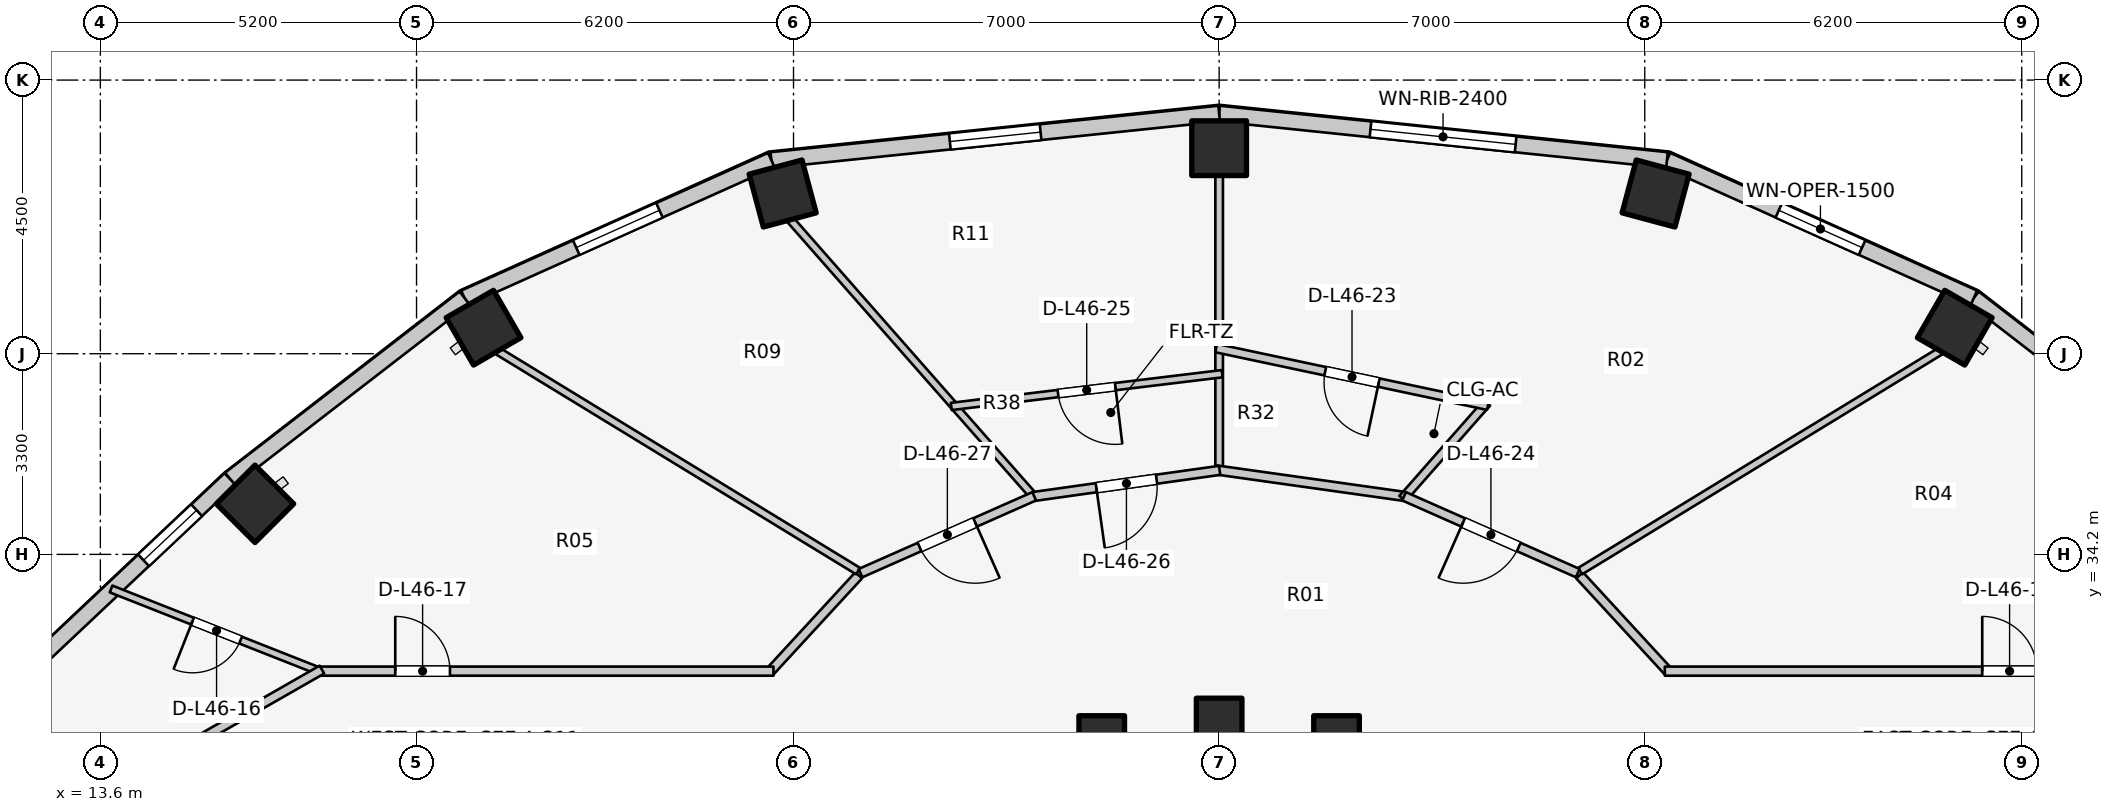
"""IFC4 building model, lengths in metres.
Left out: names, types, materials, properties, quantities, classifications, styles, units other than length and angle.
Written with IfcOpenShell. Run it as: python <this file> out.ifc"""

import sys

from ifc_helpers import new_model, si_unit, direction, frame, frame_2d, origin, origin_2d, place, context, subcontext, project, spatial, rectangle, extrude, element, fill, save


model = new_model("IFC4")
c1 = context("Model", 3, precision=1e-05, world=origin(), true_north=direction((0.0, 1.0)))
c2 = subcontext(c1, "Body", "Model", "MODEL_VIEW")
j1 = project(units=[si_unit("LENGTHUNIT", "METRE"), si_unit("PLANEANGLEUNIT", "RADIAN")], contexts=[c1])
p1 = place(None, origin())
s1 = spatial("IfcSite", under=j1, at=p1, CompositionType="ELEMENT")
p2 = place(p1, origin())
s2 = spatial("IfcBuilding", under=s1, at=p2, CompositionType="ELEMENT")
p3 = place(p2, frame((0.0, 0.0, 152.9)))
s3 = spatial("IfcBuildingStorey", under=s2, at=p3, CompositionType="ELEMENT", Elevation=152.9)
p4 = place(p3, frame((44.098, 37.928, 0.0), z_axis=(0.0, 0.0, 1.0), x_axis=(0.5, 0.866025403784, 0.0)))
e1 = element("IfcColumn", 1, at=p4, inside=s3, PredefinedType="COLUMN", context=c2, shape_type="SweptSolid", body=[
    extrude(rectangle(XDim=0.9, YDim=0.9, at=origin_2d()), origin(), (0.0, 0.0, 1.0), 3.1),
])
p5 = place(p3, frame((33.931, 31.172, 0.0), z_axis=(0.0, 0.0, 1.0), x_axis=(1.0, 0.0, 0.0)))
e2 = element("IfcColumn", 2, at=p5, inside=s3, PredefinedType="COLUMN", context=c2, shape_type="SweptSolid", body=[
    extrude(rectangle(XDim=0.75, YDim=0.75, at=origin_2d()), origin(), (0.0, 0.0, 1.0), 3.1),
])
p6 = place(p3, frame((39.178, 40.135, 0.0), z_axis=(0.0, 0.0, 1.0), x_axis=(0.258819045103, 0.965925826289, 0.0)))
e3 = element("IfcColumn", 3, at=p6, inside=s3, PredefinedType="COLUMN", context=c2, shape_type="SweptSolid", body=[
    extrude(rectangle(XDim=0.9, YDim=0.9, at=origin_2d()), origin(), (0.0, 0.0, 1.0), 3.1),
])
p7 = place(p3, frame((32.0, 31.46, 0.0), z_axis=(0.0, 0.0, 1.0), x_axis=(1.0, 0.0, 0.0)))
e4 = element("IfcColumn", 4, at=p7, inside=s3, PredefinedType="COLUMN", context=c2, shape_type="SweptSolid", body=[
    extrude(rectangle(XDim=0.75, YDim=0.75, at=origin_2d()), origin(), (0.0, 0.0, 1.0), 3.1),
])
p8 = place(p3, frame((32.0, 40.88, 0.0), z_axis=(0.0, 0.0, 1.0), x_axis=(0.0, 1.0, 0.0)))
e5 = element("IfcColumn", 5, at=p8, inside=s3, PredefinedType="COLUMN", context=c2, shape_type="SweptSolid", body=[
    extrude(rectangle(XDim=0.9, YDim=0.9, at=origin_2d()), origin(), (0.0, 0.0, 1.0), 3.1),
])
p9 = place(p3, frame((30.069, 31.172, 0.0), z_axis=(0.0, 0.0, 1.0), x_axis=(1.0, 0.0, 0.0)))
e6 = element("IfcColumn", 6, at=p9, inside=s3, PredefinedType="COLUMN", context=c2, shape_type="SweptSolid", body=[
    extrude(rectangle(XDim=0.75, YDim=0.75, at=origin_2d()), origin(), (0.0, 0.0, 1.0), 3.1),
])
for number, where, z_axis, x_axis in (
    (7, (24.822, 40.135, 0.0), (0.0, 0.0, 1.0), (-0.259, 0.966, 0.0)),
    (8, (19.902, 37.928, 0.0), (0.0, 0.0, 1.0), (-0.5, 0.866, 0.0)),
    (9, (16.143, 35.031, 0.0), (0.0, 0.0, 1.0), (-0.707, 0.707, 0.0)),
):
    element("IfcColumn", number, at=place(p3, frame(where, z_axis=z_axis, x_axis=x_axis)), inside=s3, PredefinedType="COLUMN", context=c2, shape_type="SweptSolid", body=[
        extrude(rectangle(XDim=0.9, YDim=0.9, at=origin_2d()), origin(), (0.0, 0.0, 1.0), 3.1),
    ])
p10 = place(p3, frame((48.269, 35.441, 0.0), z_axis=(0.0, 0.0, 1.0), x_axis=(-0.791460185804, 0.611220724687, 0.0)))
e10 = element("IfcWall", 10, at=p10, inside=s3, PredefinedType="STANDARD", context=c2, shape_type="SweptSolid", body=[
    extrude(rectangle(XDim=4.872, YDim=0.26, at=frame_2d((2.436, 0.0))), origin(), (0.0, 0.0, 1.0), 2.85),
])
p11 = place(p3, frame((44.413, 38.419, 0.0), z_axis=(0.0, 0.0, 1.0), x_axis=(-0.912353637112, 0.409403029847, 0.0)))
e11 = element("IfcWall", 11, at=p11, inside=s3, PredefinedType="STANDARD", context=c2, shape_type="SweptSolid", body=[
    extrude(rectangle(XDim=5.533, YDim=0.26, at=frame_2d((2.766, 0.0))), origin(), (0.0, 0.0, 1.0), 2.85),
])
p12 = place(p11, frame((2.016, 0.0, 0.75)))
e12 = element("IfcOpeningElement", 12, at=p12, cuts=e11, PredefinedType="OPENING", context=c2, shape_type="SweptSolid", body=[
    extrude(rectangle(XDim=1.5, YDim=1.6, at=frame_2d((0.75, 0.8))), frame((0.0, 0.14, 0.0), z_axis=(0.0, -1.0, 0.0), x_axis=(1.0, 0.0, 0.0)), (0.0, 0.0, 1.0), 0.28),
])
p13 = place(p3, frame((39.365, 40.685, 0.0), z_axis=(0.0, 0.0, 1.0), x_axis=(-0.994664178965, 0.10316574569, 0.0)))
e13 = element("IfcWall", 13, at=p13, inside=s3, PredefinedType="STANDARD", context=c2, shape_type="SweptSolid", body=[
    extrude(rectangle(XDim=7.405, YDim=0.26, at=frame_2d((3.702, 0.0))), origin(), (0.0, 0.0, 1.0), 2.85),
])
p14 = place(p13, frame((2.502, 0.0, 0.75)))
e14 = element("IfcOpeningElement", 14, at=p14, cuts=e13, PredefinedType="OPENING", context=c2, shape_type="SweptSolid", body=[
    extrude(rectangle(XDim=2.4, YDim=1.7, at=frame_2d((1.2, 0.85))), frame((0.0, 0.14, 0.0), z_axis=(0.0, -1.0, 0.0), x_axis=(1.0, 0.0, 0.0)), (0.0, 0.0, 1.0), 0.28),
])
p15 = place(p3, frame((32.0, 41.448, 0.0), z_axis=(0.0, 0.0, 1.0), x_axis=(-0.994664178965, -0.10316574569, 0.0)))
e15 = element("IfcWall", 15, at=p15, inside=s3, PredefinedType="STANDARD", context=c2, shape_type="SweptSolid", body=[
    extrude(rectangle(XDim=7.405, YDim=0.26, at=frame_2d((3.702, 0.0))), origin(), (0.0, 0.0, 1.0), 2.85),
])
p16 = place(p15, frame((2.952, 0.0, 0.75)))
e16 = element("IfcOpeningElement", 16, at=p16, cuts=e15, PredefinedType="OPENING", context=c2, shape_type="SweptSolid", body=[
    extrude(rectangle(XDim=1.5, YDim=1.6, at=frame_2d((0.75, 0.8))), frame((0.0, 0.14, 0.0), z_axis=(0.0, -1.0, 0.0), x_axis=(1.0, 0.0, 0.0)), (0.0, 0.0, 1.0), 0.28),
])
p17 = place(p3, frame((24.635, 40.685, 0.0), z_axis=(0.0, 0.0, 1.0), x_axis=(-0.912353637112, -0.409403029847, 0.0)))
e17 = element("IfcWall", 17, at=p17, inside=s3, PredefinedType="STANDARD", context=c2, shape_type="SweptSolid", body=[
    extrude(rectangle(XDim=5.533, YDim=0.26, at=frame_2d((2.766, 0.0))), origin(), (0.0, 0.0, 1.0), 2.85),
])
p18 = place(p17, frame((2.016, 0.0, 0.75)))
e18 = element("IfcOpeningElement", 18, at=p18, cuts=e17, PredefinedType="OPENING", context=c2, shape_type="SweptSolid", body=[
    extrude(rectangle(XDim=1.5, YDim=1.6, at=frame_2d((0.75, 0.8))), frame((0.0, 0.14, 0.0), z_axis=(0.0, -1.0, 0.0), x_axis=(1.0, 0.0, 0.0)), (0.0, 0.0, 1.0), 0.28),
])
p19 = place(p3, frame((19.587, 38.419, 0.0), z_axis=(0.0, 0.0, 1.0), x_axis=(-0.791460185804, -0.611220724687, 0.0)))
e19 = element("IfcWall", 19, at=p19, inside=s3, PredefinedType="STANDARD", context=c2, shape_type="SweptSolid", body=[
    extrude(rectangle(XDim=4.872, YDim=0.26, at=frame_2d((2.436, 0.0))), origin(), (0.0, 0.0, 1.0), 2.85),
])
p20 = place(p3, frame((15.731, 35.441, 0.0), z_axis=(0.0, 0.0, 1.0), x_axis=(-0.727667301037, -0.68593024354, 0.0)))
e20 = element("IfcWall", 20, at=p20, inside=s3, PredefinedType="STANDARD", context=c2, shape_type="SweptSolid", body=[
    extrude(rectangle(XDim=4.604, YDim=0.26, at=frame_2d((2.302, 0.0))), origin(), (0.0, 0.0, 1.0), 2.85),
])
p21 = place(p20, frame((0.751, 0.0, 0.75)))
e21 = element("IfcOpeningElement", 21, at=p21, cuts=e20, PredefinedType="OPENING", context=c2, shape_type="SweptSolid", body=[
    extrude(rectangle(XDim=1.2, YDim=1.5, at=frame_2d((0.6, 0.75))), frame((0.0, 0.14, 0.0), z_axis=(0.0, -1.0, 0.0), x_axis=(1.0, 0.0, 0.0)), (0.0, 0.0, 1.0), 0.28),
])
p22 = place(p3, frame((37.928, 33.856, 0.0), z_axis=(0.0, 0.0, 1.0), x_axis=(0.677579737957, -0.735449317567, 0.0)))
e22 = element("IfcWall", 22, at=p22, inside=s3, PredefinedType="PARTITIONING", context=c2, shape_type="SweptSolid", body=[
    extrude(rectangle(XDim=2.173, YDim=0.15, at=frame_2d((1.086, 0.0))), origin(), (0.0, 0.0, 1.0), 2.299),
])
p23 = place(p3, frame((39.33, 32.28, 0.0), z_axis=(0.0, 0.0, 1.0), x_axis=(1.0, 0.0, 0.0)))
e23 = element("IfcWall", 23, at=p23, inside=s3, PredefinedType="PARTITIONING", context=c2, shape_type="SweptSolid", body=[
    extrude(rectangle(XDim=7.52, YDim=0.15, at=frame_2d((3.76, 0.0))), origin(), (0.0, 0.0, 1.0), 2.299),
])
p24 = place(p23, frame((5.22, 0.0, 0.0)))
e24 = element("IfcOpeningElement", 24, at=p24, cuts=e23, PredefinedType="OPENING", context=c2, shape_type="SweptSolid", body=[
    extrude(rectangle(XDim=0.9, YDim=2.1, at=frame_2d((0.45, 1.05))), frame((0.0, 0.085, 0.0), z_axis=(0.0, -1.0, 0.0), x_axis=(1.0, 0.0, 0.0)), (0.0, 0.0, 1.0), 0.17),
])
p25 = place(p3, frame((17.247, 32.262, 0.0), z_axis=(0.0, 0.0, 1.0), x_axis=(-0.930204027108, 0.367042869367, 0.0)))
e25 = element("IfcWall", 25, at=p25, inside=s3, PredefinedType="MOVABLE", context=c2, shape_type="SweptSolid", body=[
    extrude(rectangle(XDim=3.731, YDim=0.12, at=frame_2d((1.865, 0.0))), origin(), (0.0, 0.0, 1.0), 2.22),
])
p26 = place(p25, frame((1.44, 0.0, 0.0)))
e26 = element("IfcOpeningElement", 26, at=p26, cuts=e25, PredefinedType="OPENING", context=c2, shape_type="SweptSolid", body=[
    extrude(rectangle(XDim=0.85, YDim=2.05, at=frame_2d((0.425, 1.025))), frame((0.0, 0.07, 0.0), z_axis=(0.0, -1.0, 0.0), x_axis=(1.0, 0.0, 0.0)), (0.0, 0.0, 1.0), 0.14),
])
p27 = place(p3, frame((26.072, 33.856, 0.0), z_axis=(0.0, 0.0, 1.0), x_axis=(-0.677579737957, -0.735449317567, 0.0)))
e27 = element("IfcWall", 27, at=p27, inside=s3, PredefinedType="PARTITIONING", context=c2, shape_type="SweptSolid", body=[
    extrude(rectangle(XDim=2.173, YDim=0.15, at=frame_2d((1.086, 0.0))), origin(), (0.0, 0.0, 1.0), 2.299),
])
p28 = place(p3, frame((17.15, 32.28, 0.0), z_axis=(0.0, 0.0, 1.0), x_axis=(1.0, 0.0, 0.0)))
e28 = element("IfcWall", 28, at=p28, inside=s3, PredefinedType="PARTITIONING", context=c2, shape_type="SweptSolid", body=[
    extrude(rectangle(XDim=7.52, YDim=0.15, at=frame_2d((3.76, 0.0))), origin(), (0.0, 0.0, 1.0), 2.299),
])
p29 = place(p28, frame((1.3, 0.0, 0.0)))
e29 = element("IfcOpeningElement", 29, at=p29, cuts=e28, PredefinedType="OPENING", context=c2, shape_type="SweptSolid", body=[
    extrude(rectangle(XDim=0.9, YDim=2.1, at=frame_2d((0.45, 1.05))), frame((0.0, 0.085, 0.0), z_axis=(0.0, -1.0, 0.0), x_axis=(1.0, 0.0, 0.0)), (0.0, 0.0, 1.0), 0.17),
])
p30 = place(p3, frame((17.243, 32.305, 0.0), z_axis=(0.0, 0.0, 1.0), x_axis=(-0.867991349648, -0.496579315857, 0.0)))
e30 = element("IfcWall", 30, at=p30, inside=s3, PredefinedType="PARTITIONING", context=c2, shape_type="SweptSolid", body=[
    extrude(rectangle(XDim=2.567, YDim=0.15, at=frame_2d((1.283, 0.0))), origin(), (0.0, 0.0, 1.0), 2.22),
])
p31 = place(p3, frame((37.938, 33.925, 0.0), z_axis=(0.0, 0.0, 1.0), x_axis=(0.853440334679, 0.521190555501, 0.0)))
e31 = element("IfcWall", 31, at=p31, inside=s3, PredefinedType="PARTITIONING", context=c2, shape_type="SweptSolid", body=[
    extrude(rectangle(XDim=6.966, YDim=0.125, at=frame_2d((3.483, 0.0))), origin(), (0.0, 0.0, 1.0), 2.299),
])
p32 = place(p3, frame((32.0, 35.637, 0.0), z_axis=(0.0, 0.0, 1.0), x_axis=(0.0, 1.0, 0.0)))
e32 = element("IfcWall", 32, at=p32, inside=s3, PredefinedType="PARTITIONING", context=c2, shape_type="SweptSolid", body=[
    extrude(rectangle(XDim=4.813, YDim=0.125, at=frame_2d((2.406, 0.0))), origin(), (0.0, 0.0, 1.0), 2.299),
])
p33 = place(p3, frame((28.914, 35.195, 0.0), z_axis=(0.0, 0.0, 1.0), x_axis=(-0.660581320981, 0.750754499401, 0.0)))
e33 = element("IfcWall", 33, at=p33, inside=s3, PredefinedType="PARTITIONING", context=c2, shape_type="SweptSolid", body=[
    extrude(rectangle(XDim=6.027, YDim=0.125, at=frame_2d((3.013, 0.0))), origin(), (0.0, 0.0, 1.0), 2.299),
])
p34 = place(p3, frame((26.062, 33.925, 0.0), z_axis=(0.0, 0.0, 1.0), x_axis=(-0.853440334679, 0.521190555501, 0.0)))
e34 = element("IfcWall", 34, at=p34, inside=s3, PredefinedType="PARTITIONING", context=c2, shape_type="SweptSolid", body=[
    extrude(rectangle(XDim=6.966, YDim=0.125, at=frame_2d((3.483, 0.0))), origin(), (0.0, 0.0, 1.0), 2.299),
])
p35 = place(p3, frame((35.099, 35.146, 0.0), z_axis=(0.0, 0.0, 1.0), x_axis=(-0.990251283702, 0.139292480508, 0.0)))
e35 = element("IfcWall", 35, at=p35, inside=s3, PredefinedType="PARTITIONING", context=c2, shape_type="SweptSolid", body=[
    extrude(rectangle(XDim=3.179, YDim=0.15, at=frame_2d((1.59, 0.0))), origin(), (0.0, 0.0, 1.0), 2.299),
])
p36 = place(p3, frame((35.016, 35.116, 0.0), z_axis=(0.0, 0.0, 1.0), x_axis=(0.660559753652, 0.750773475727, 0.0)))
e36 = element("IfcWall", 36, at=p36, inside=s3, PredefinedType="PLUMBINGWALL", context=c2, shape_type="SweptSolid", body=[
    extrude(rectangle(XDim=2.1, YDim=0.14, at=frame_2d((1.05, 0.0))), origin(), (0.0, 0.0, 1.0), 2.385),
])
p37 = place(p3, frame((36.419, 36.644, 0.0), z_axis=(0.0, 0.0, 1.0), x_axis=(-0.978225905005, 0.20754295646, 0.0)))
e37 = element("IfcWall", 37, at=p37, inside=s3, PredefinedType="PLUMBINGWALL", context=c2, shape_type="SweptSolid", body=[
    extrude(rectangle(XDim=4.568, YDim=0.14, at=frame_2d((2.284, 0.0))), origin(), (0.0, 0.0, 1.0), 2.299),
])
p38 = place(p37, frame((1.834, 0.0, 0.0)))
e38 = element("IfcOpeningElement", 38, at=p38, cuts=e37, PredefinedType="OPENING", context=c2, shape_type="SweptSolid", body=[
    extrude(rectangle(XDim=0.9, YDim=2.1, at=frame_2d((0.45, 1.05))), frame((0.0, 0.08, 0.0), z_axis=(0.0, -1.0, 0.0), x_axis=(1.0, 0.0, 0.0)), (0.0, 0.0, 1.0), 0.16),
])
p39 = place(p3, frame((37.898, 33.892, 0.0), z_axis=(0.0, 0.0, 1.0), x_axis=(-0.914519212393, 0.40454247016, 0.0)))
e39 = element("IfcWall", 39, at=p39, inside=s3, PredefinedType="PARTITIONING", context=c2, shape_type="SweptSolid", body=[
    extrude(rectangle(XDim=3.124, YDim=0.15, at=frame_2d((1.562, 0.0))), origin(), (0.0, 0.0, 1.0), 2.299),
])
p40 = place(p39, frame((1.062, 0.0, 0.0)))
e40 = element("IfcOpeningElement", 40, at=p40, cuts=e39, PredefinedType="OPENING", context=c2, shape_type="SweptSolid", body=[
    extrude(rectangle(XDim=1.0, YDim=2.1, at=frame_2d((0.5, 1.05))), frame((0.0, 0.085, 0.0), z_axis=(0.0, -1.0, 0.0), x_axis=(1.0, 0.0, 0.0)), (0.0, 0.0, 1.0), 0.17),
])
p41 = place(p3, frame((32.05, 37.171, 0.0), z_axis=(0.0, 0.0, 1.0), x_axis=(-0.992759753087, -0.120116912424, 0.0)))
e41 = element("IfcWall", 41, at=p41, inside=s3, PredefinedType="MOVABLE", context=c2, shape_type="SweptSolid", body=[
    extrude(rectangle(XDim=4.488, YDim=0.12, at=frame_2d((2.244, 0.0))), origin(), (0.0, 0.0, 1.0), 2.299),
])
p42 = place(p41, frame((1.769, 0.0, 0.0)))
e42 = element("IfcOpeningElement", 42, at=p42, cuts=e41, PredefinedType="OPENING", context=c2, shape_type="SweptSolid", body=[
    extrude(rectangle(XDim=0.95, YDim=2.1, at=frame_2d((0.475, 1.05))), frame((0.0, 0.07, 0.0), z_axis=(0.0, -1.0, 0.0), x_axis=(1.0, 0.0, 0.0)), (0.0, 0.0, 1.0), 0.14),
])
p43 = place(p3, frame((32.008, 35.582, 0.0), z_axis=(0.0, 0.0, 1.0), x_axis=(-0.990254709652, -0.13926812274, 0.0)))
e43 = element("IfcWall", 43, at=p43, inside=s3, PredefinedType="PARTITIONING", context=c2, shape_type="SweptSolid", body=[
    extrude(rectangle(XDim=3.096, YDim=0.15, at=frame_2d((1.548, 0.0))), origin(), (0.0, 0.0, 1.0), 2.299),
])
p44 = place(p43, frame((1.048, 0.0, 0.0)))
e44 = element("IfcOpeningElement", 44, at=p44, cuts=e43, PredefinedType="OPENING", context=c2, shape_type="SweptSolid", body=[
    extrude(rectangle(XDim=1.0, YDim=2.1, at=frame_2d((0.5, 1.05))), frame((0.0, 0.085, 0.0), z_axis=(0.0, -1.0, 0.0), x_axis=(1.0, 0.0, 0.0)), (0.0, 0.0, 1.0), 0.17),
])
p45 = place(p3, frame((28.958, 35.156, 0.0), z_axis=(0.0, 0.0, 1.0), x_axis=(-0.914519212393, -0.40454247016, 0.0)))
e45 = element("IfcWall", 45, at=p45, inside=s3, PredefinedType="PARTITIONING", context=c2, shape_type="SweptSolid", body=[
    extrude(rectangle(XDim=3.124, YDim=0.15, at=frame_2d((1.562, 0.0))), origin(), (0.0, 0.0, 1.0), 2.299),
])
p46 = place(p45, frame((1.062, 0.0, 0.0)))
e46 = element("IfcOpeningElement", 46, at=p46, cuts=e45, PredefinedType="OPENING", context=c2, shape_type="SweptSolid", body=[
    extrude(rectangle(XDim=1.0, YDim=2.1, at=frame_2d((0.5, 1.05))), frame((0.0, 0.085, 0.0), z_axis=(0.0, -1.0, 0.0), x_axis=(1.0, 0.0, 0.0)), (0.0, 0.0, 1.0), 0.17),
])
p47 = place(p12, origin())
e47 = element("IfcWindow", 47, at=p47, inside=s3, PartitioningType="SINGLE_PANEL", PredefinedType="WINDOW", context=c2, shape_type="SweptSolid", body=[
    extrude(rectangle(XDim=1.5, YDim=1.6, at=frame_2d((0.75, 0.8))), frame((0.0, 0.03, 0.0), z_axis=(0.0, -1.0, 0.0), x_axis=(1.0, 0.0, 0.0)), (0.0, 0.0, 1.0), 0.06),
])
fill(e12, e47)
p48 = place(p14, origin())
e48 = element("IfcWindow", 48, at=p48, inside=s3, PartitioningType="SINGLE_PANEL", PredefinedType="WINDOW", context=c2, shape_type="SweptSolid", body=[
    extrude(rectangle(XDim=2.4, YDim=1.7, at=frame_2d((1.2, 0.85))), frame((0.0, 0.03, 0.0), z_axis=(0.0, -1.0, 0.0), x_axis=(1.0, 0.0, 0.0)), (0.0, 0.0, 1.0), 0.06),
])
fill(e14, e48)
p49 = place(p16, origin())
e49 = element("IfcWindow", 49, at=p49, inside=s3, PartitioningType="SINGLE_PANEL", PredefinedType="WINDOW", context=c2, shape_type="SweptSolid", body=[
    extrude(rectangle(XDim=1.5, YDim=1.6, at=frame_2d((0.75, 0.8))), frame((0.0, 0.03, 0.0), z_axis=(0.0, -1.0, 0.0), x_axis=(1.0, 0.0, 0.0)), (0.0, 0.0, 1.0), 0.06),
])
fill(e16, e49)
p50 = place(p18, origin())
e50 = element("IfcWindow", 50, at=p50, inside=s3, PartitioningType="SINGLE_PANEL", PredefinedType="WINDOW", context=c2, shape_type="SweptSolid", body=[
    extrude(rectangle(XDim=1.5, YDim=1.6, at=frame_2d((0.75, 0.8))), frame((0.0, 0.03, 0.0), z_axis=(0.0, -1.0, 0.0), x_axis=(1.0, 0.0, 0.0)), (0.0, 0.0, 1.0), 0.06),
])
fill(e18, e50)
p51 = place(p21, origin())
e51 = element("IfcWindow", 51, at=p51, inside=s3, PartitioningType="SINGLE_PANEL", PredefinedType="WINDOW", context=c2, shape_type="SweptSolid", body=[
    extrude(rectangle(XDim=1.2, YDim=1.5, at=frame_2d((0.6, 0.75))), frame((0.0, 0.03, 0.0), z_axis=(0.0, -1.0, 0.0), x_axis=(1.0, 0.0, 0.0)), (0.0, 0.0, 1.0), 0.06),
])
fill(e21, e51)
p52 = place(p24, origin())
e52 = element("IfcDoor", 52, at=p52, inside=s3, OperationType="SINGLE_SWING_LEFT", PredefinedType="DOOR", context=c2, shape_type="SweptSolid", body=[
    extrude(rectangle(XDim=0.9, YDim=2.1, at=frame_2d((0.45, 1.05))), frame((0.0, 0.025, 0.0), z_axis=(0.0, -1.0, 0.0), x_axis=(1.0, 0.0, 0.0)), (0.0, 0.0, 1.0), 0.05),
])
fill(e24, e52)
p53 = place(p26, origin())
e53 = element("IfcDoor", 53, at=p53, inside=s3, OperationType="SINGLE_SWING_RIGHT", PredefinedType="DOOR", context=c2, shape_type="SweptSolid", body=[
    extrude(rectangle(XDim=0.85, YDim=2.05, at=frame_2d((0.425, 1.025))), frame((0.0, 0.025, 0.0), z_axis=(0.0, -1.0, 0.0), x_axis=(1.0, 0.0, 0.0)), (0.0, 0.0, 1.0), 0.05),
])
fill(e26, e53)
p54 = place(p29, origin())
e54 = element("IfcDoor", 54, at=p54, inside=s3, OperationType="SINGLE_SWING_LEFT", PredefinedType="DOOR", context=c2, shape_type="SweptSolid", body=[
    extrude(rectangle(XDim=0.9, YDim=2.1, at=frame_2d((0.45, 1.05))), frame((0.0, 0.025, 0.0), z_axis=(0.0, -1.0, 0.0), x_axis=(1.0, 0.0, 0.0)), (0.0, 0.0, 1.0), 0.05),
])
fill(e29, e54)
p55 = place(p38, origin())
e55 = element("IfcDoor", 55, at=p55, inside=s3, OperationType="SINGLE_SWING_LEFT", PredefinedType="DOOR", context=c2, shape_type="SweptSolid", body=[
    extrude(rectangle(XDim=0.9, YDim=2.1, at=frame_2d((0.45, 1.05))), frame((0.0, 0.025, 0.0), z_axis=(0.0, -1.0, 0.0), x_axis=(1.0, 0.0, 0.0)), (0.0, 0.0, 1.0), 0.05),
])
fill(e38, e55)
p56 = place(p40, origin())
e56 = element("IfcDoor", 56, at=p56, inside=s3, OperationType="SINGLE_SWING_RIGHT", PredefinedType="DOOR", context=c2, shape_type="SweptSolid", body=[
    extrude(rectangle(XDim=1.0, YDim=2.1, at=frame_2d((0.5, 1.05))), frame((0.0, 0.025, 0.0), z_axis=(0.0, -1.0, 0.0), x_axis=(1.0, 0.0, 0.0)), (0.0, 0.0, 1.0), 0.05),
])
fill(e40, e56)
p57 = place(p42, origin())
e57 = element("IfcDoor", 57, at=p57, inside=s3, OperationType="SINGLE_SWING_LEFT", PredefinedType="DOOR", context=c2, shape_type="SweptSolid", body=[
    extrude(rectangle(XDim=0.95, YDim=2.1, at=frame_2d((0.475, 1.05))), frame((0.0, 0.025, 0.0), z_axis=(0.0, -1.0, 0.0), x_axis=(1.0, 0.0, 0.0)), (0.0, 0.0, 1.0), 0.05),
])
fill(e42, e57)
p58 = place(p44, origin())
e58 = element("IfcDoor", 58, at=p58, inside=s3, OperationType="SINGLE_SWING_RIGHT", PredefinedType="DOOR", context=c2, shape_type="SweptSolid", body=[
    extrude(rectangle(XDim=1.0, YDim=2.1, at=frame_2d((0.5, 1.05))), frame((0.0, 0.025, 0.0), z_axis=(0.0, -1.0, 0.0), x_axis=(1.0, 0.0, 0.0)), (0.0, 0.0, 1.0), 0.05),
])
fill(e44, e58)
p59 = place(p46, origin())
e59 = element("IfcDoor", 59, at=p59, inside=s3, OperationType="SINGLE_SWING_LEFT", PredefinedType="DOOR", context=c2, shape_type="SweptSolid", body=[
    extrude(rectangle(XDim=1.0, YDim=2.1, at=frame_2d((0.5, 1.05))), frame((0.0, 0.025, 0.0), z_axis=(0.0, -1.0, 0.0), x_axis=(1.0, 0.0, 0.0)), (0.0, 0.0, 1.0), 0.05),
])
fill(e46, e59)
save(model, sys.argv[1])
